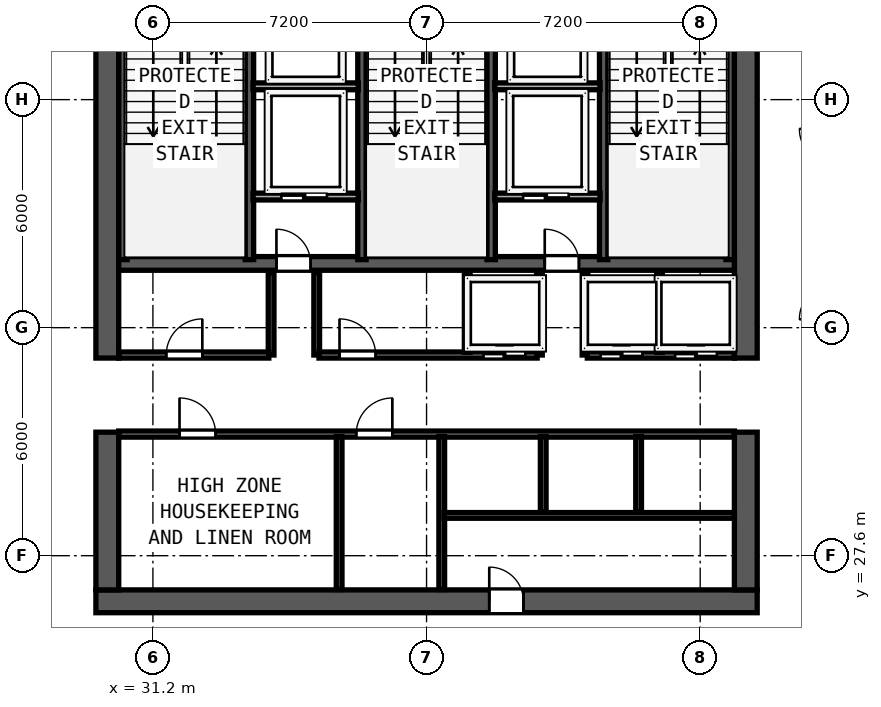
"""IFC4 building model, lengths in metres.
Left out: names, types, materials, properties, quantities, classifications, styles, units other than length and angle.
Written with IfcOpenShell. Run it as: python <this file> out.ifc"""

import sys

from ifc_helpers import new_model, si_unit, direction, frame, frame_2d, origin, place, context, subcontext, project, spatial, rectangle, extrude, element, fill, save


model = new_model("IFC4")
c1 = context("Model", 3, precision=1e-05, world=origin(), true_north=direction((0.0, 1.0)))
c2 = subcontext(c1, "Body", "Model", "MODEL_VIEW")
j1 = project(units=[si_unit("LENGTHUNIT", "METRE"), si_unit("PLANEANGLEUNIT", "RADIAN")], contexts=[c1])
p1 = place(None, origin())
s1 = spatial("IfcSite", under=j1, at=p1, CompositionType="ELEMENT")
p2 = place(p1, origin())
s2 = spatial("IfcBuilding", under=s1, at=p2, CompositionType="ELEMENT")
p3 = place(p2, frame((0.0, 0.0, 191.8)))
s3 = spatial("IfcBuildingStorey", under=s2, at=p3, CompositionType="ELEMENT", Elevation=191.8)
p4 = place(p3, frame((29.7, 26.4, 0.0), z_axis=(0.0, 0.0, 1.0), x_axis=(1.0, 0.0, 0.0)))
e1 = element("IfcWall", 1, at=p4, inside=s3, PredefinedType="SHEAR", context=c2, shape_type="SweptSolid", body=[
    extrude(rectangle(XDim=17.4, YDim=0.6, at=frame_2d((8.7, 0.0))), origin(), (0.0, 0.0, 1.0), 3.62),
])
p5 = place(p4, frame((11.25, 0.0, 0.0), z_axis=(0.0, 0.0, 1.0), x_axis=(-1.0, 0.0, 0.0)))
e2 = element("IfcOpeningElement", 2, at=p5, cuts=e1, PredefinedType="OPENING", context=c2, shape_type="SweptSolid", body=[
    extrude(rectangle(XDim=0.9, YDim=2.1, at=frame_2d((0.45, 1.05))), frame((0.0, 0.31, 0.0), z_axis=(0.0, -1.0, 0.0), x_axis=(1.0, 0.0, 0.0)), (0.0, 0.0, 1.0), 0.62),
])
p6 = place(p3, frame((30.0, 26.7, 0.0), z_axis=(0.0, 0.0, 1.0), x_axis=(0.0, 1.0, 0.0)))
e3 = element("IfcWall", 3, at=p6, inside=s3, PredefinedType="SHEAR", context=c2, shape_type="SweptSolid", body=[
    extrude(rectangle(XDim=4.15, YDim=0.6, at=frame_2d((2.075, 0.0))), origin(), (0.0, 0.0, 1.0), 3.62),
])
p7 = place(p3, frame((30.0, 32.8, 0.0), z_axis=(0.0, 0.0, 1.0), x_axis=(0.0, 1.0, 0.0)))
e4 = element("IfcWall", 4, at=p7, inside=s3, PredefinedType="SHEAR", context=c2, shape_type="SweptSolid", body=[
    extrude(rectangle(XDim=10.1, YDim=0.6, at=frame_2d((5.05, 0.0))), origin(), (0.0, 0.0, 1.0), 3.62),
])
p8 = place(p3, frame((46.8, 26.7, 0.0), z_axis=(0.0, 0.0, 1.0), x_axis=(0.0, 1.0, 0.0)))
e5 = element("IfcWall", 5, at=p8, inside=s3, PredefinedType="SHEAR", context=c2, shape_type="SweptSolid", body=[
    extrude(rectangle(XDim=4.15, YDim=0.6, at=frame_2d((2.075, 0.0))), origin(), (0.0, 0.0, 1.0), 3.62),
])
p9 = place(p3, frame((46.8, 32.8, 0.0), z_axis=(0.0, 0.0, 1.0), x_axis=(0.0, 1.0, 0.0)))
e6 = element("IfcWall", 6, at=p9, inside=s3, PredefinedType="SHEAR", context=c2, shape_type="SweptSolid", body=[
    extrude(rectangle(XDim=10.1, YDim=0.6, at=frame_2d((5.05, 0.0))), origin(), (0.0, 0.0, 1.0), 3.62),
])
p10 = place(p3, frame((30.3, 35.29, 0.0), z_axis=(0.0, 0.0, 1.0), x_axis=(1.0, 0.0, 0.0)))
e7 = element("IfcWall", 7, at=p10, inside=s3, PredefinedType="SHEAR", context=c2, shape_type="SweptSolid", body=[
    extrude(rectangle(XDim=16.2, YDim=0.36, at=frame_2d((8.1, 0.0))), origin(), (0.0, 0.0, 1.0), 3.62),
])
p11 = place(p10, frame((5.05, 0.0, 0.0), z_axis=(0.0, 0.0, 1.0), x_axis=(-1.0, 0.0, 0.0)))
e8 = element("IfcOpeningElement", 8, at=p11, cuts=e7, PredefinedType="OPENING", context=c2, shape_type="SweptSolid", body=[
    extrude(rectangle(XDim=0.9, YDim=2.1, at=frame_2d((0.45, 1.05))), frame((0.0, 0.19, 0.0), z_axis=(0.0, -1.0, 0.0), x_axis=(1.0, 0.0, 0.0)), (0.0, 0.0, 1.0), 0.38),
])
p12 = place(p10, frame((12.11, 0.0, 0.0), z_axis=(0.0, 0.0, 1.0), x_axis=(-1.0, 0.0, 0.0)))
e9 = element("IfcOpeningElement", 9, at=p12, cuts=e7, PredefinedType="OPENING", context=c2, shape_type="SweptSolid", body=[
    extrude(rectangle(XDim=0.9, YDim=2.1, at=frame_2d((0.45, 1.05))), frame((0.0, 0.19, 0.0), z_axis=(0.0, -1.0, 0.0), x_axis=(1.0, 0.0, 0.0)), (0.0, 0.0, 1.0), 0.38),
])
for number, where, z_axis, x_axis in (
    (10, (30.412, 35.39, 0.0), (0.0, 0.0, 1.0), (0.0, 1.0, 0.0)),
    (11, (33.74, 35.39, 0.0), (0.0, 0.0, 1.0), (0.0, 1.0, 0.0)),
    (12, (36.7, 35.39, 0.0), (0.0, 0.0, 1.0), (0.0, 1.0, 0.0)),
    (13, (40.1, 35.39, 0.0), (0.0, 0.0, 1.0), (0.0, 1.0, 0.0)),
    (14, (43.06, 35.39, 0.0), (0.0, 0.0, 1.0), (0.0, 1.0, 0.0)),
    (15, (46.388, 35.39, 0.0), (0.0, 0.0, 1.0), (0.0, 1.0, 0.0)),
):
    element("IfcWall", number, at=place(p3, frame(where, z_axis=z_axis, x_axis=x_axis)), inside=s3, PredefinedType="SHEAR", context=c2, shape_type="SweptSolid", body=[
        extrude(rectangle(XDim=7.51, YDim=0.22, at=frame_2d((3.755, 0.0))), origin(), (0.0, 0.0, 1.0), 3.62),
    ])
for number, where, z_axis, x_axis in (
    (16, (33.835, 39.95, 0.0), (0.0, 0.0, 1.0), (1.0, 0.0, 0.0)),
    (17, (40.195, 39.95, 0.0), (0.0, 0.0, 1.0), (1.0, 0.0, 0.0)),
):
    element("IfcWall", number, at=place(p3, frame(where, z_axis=z_axis, x_axis=x_axis)), inside=s3, PredefinedType="SOLIDWALL", context=c2, shape_type="SweptSolid", body=[
        extrude(rectangle(XDim=2.77, YDim=0.18, at=frame_2d((1.385, 0.0))), origin(), (0.0, 0.0, 1.0), 3.62),
    ])
p13 = place(p3, frame((33.835, 37.05, 0.0), z_axis=(0.0, 0.0, 1.0), x_axis=(1.0, 0.0, 0.0)))
e18 = element("IfcWall", 18, at=p13, inside=s3, PredefinedType="SOLIDWALL", context=c2, shape_type="SweptSolid", body=[
    extrude(rectangle(XDim=2.77, YDim=0.18, at=frame_2d((1.385, 0.0))), origin(), (0.0, 0.0, 1.0), 3.62),
])
p14 = place(p13, frame((1.945, 0.0, 0.0), z_axis=(0.0, 0.0, 1.0), x_axis=(-1.0, 0.0, 0.0)))
e19 = element("IfcOpeningElement", 19, at=p14, cuts=e18, PredefinedType="OPENING", context=c2, shape_type="SweptSolid", body=[
    extrude(rectangle(XDim=1.2, YDim=2.2, at=frame_2d((0.6, 1.1))), frame((0.0, 0.1, 0.0), z_axis=(0.0, -1.0, 0.0), x_axis=(1.0, 0.0, 0.0)), (0.0, 0.0, 1.0), 0.2),
])
for number, where, z_axis, x_axis in (
    (20, (34.31, 32.88, 0.0), (0.0, 0.0, 1.0), (0.0, 1.0, 0.0)),
    (21, (35.51, 32.88, 0.0), (0.0, 0.0, 1.0), (0.0, 1.0, 0.0)),
):
    element("IfcWall", number, at=place(p3, frame(where, z_axis=z_axis, x_axis=x_axis)), inside=s3, PredefinedType="SOLIDWALL", context=c2, shape_type="SweptSolid", body=[
        extrude(rectangle(XDim=2.17, YDim=0.15, at=frame_2d((1.085, 0.0))), origin(), (0.0, 0.0, 1.0), 3.62),
    ])
p15 = place(p3, frame((40.195, 37.05, 0.0), z_axis=(0.0, 0.0, 1.0), x_axis=(1.0, 0.0, 0.0)))
e22 = element("IfcWall", 22, at=p15, inside=s3, PredefinedType="SOLIDWALL", context=c2, shape_type="SweptSolid", body=[
    extrude(rectangle(XDim=2.77, YDim=0.18, at=frame_2d((1.385, 0.0))), origin(), (0.0, 0.0, 1.0), 3.62),
])
p16 = place(p15, frame((1.945, 0.0, 0.0), z_axis=(0.0, 0.0, 1.0), x_axis=(-1.0, 0.0, 0.0)))
e23 = element("IfcOpeningElement", 23, at=p16, cuts=e22, PredefinedType="OPENING", context=c2, shape_type="SweptSolid", body=[
    extrude(rectangle(XDim=1.2, YDim=2.2, at=frame_2d((0.6, 1.1))), frame((0.0, 0.1, 0.0), z_axis=(0.0, -1.0, 0.0), x_axis=(1.0, 0.0, 0.0)), (0.0, 0.0, 1.0), 0.2),
])
for number, where, z_axis, x_axis in (
    (24, (41.37, 32.88, 0.0), (0.0, 0.0, 1.0), (0.0, 1.0, 0.0)),
    (25, (42.57, 32.88, 0.0), (0.0, 0.0, 1.0), (0.0, 1.0, 0.0)),
):
    element("IfcWall", number, at=place(p3, frame(where, z_axis=z_axis, x_axis=x_axis)), inside=s3, PredefinedType="SOLIDWALL", context=c2, shape_type="SweptSolid", body=[
        extrude(rectangle(XDim=2.17, YDim=0.15, at=frame_2d((1.085, 0.0))), origin(), (0.0, 0.0, 1.0), 3.62),
    ])
p17 = place(p3, frame((30.3, 32.88, 0.0), z_axis=(0.0, 0.0, 1.0), x_axis=(1.0, 0.0, 0.0)))
e26 = element("IfcWall", 26, at=p17, inside=s3, PredefinedType="SOLIDWALL", context=c2, shape_type="SweptSolid", body=[
    extrude(rectangle(XDim=3.95, YDim=0.16, at=frame_2d((1.975, 0.0))), origin(), (0.0, 0.0, 1.0), 3.62),
])
p18 = place(p17, frame((2.2, 0.0, 0.0), z_axis=(0.0, 0.0, 1.0), x_axis=(-1.0, 0.0, 0.0)))
e27 = element("IfcOpeningElement", 27, at=p18, cuts=e26, PredefinedType="OPENING", context=c2, shape_type="SweptSolid", body=[
    extrude(rectangle(XDim=0.95, YDim=2.12, at=frame_2d((0.475, 1.06))), frame((0.0, 0.09, 0.0), z_axis=(0.0, -1.0, 0.0), x_axis=(1.0, 0.0, 0.0)), (0.0, 0.0, 1.0), 0.18),
])
p19 = place(p3, frame((35.57, 32.88, 0.0), z_axis=(0.0, 0.0, 1.0), x_axis=(1.0, 0.0, 0.0)))
e28 = element("IfcWall", 28, at=p19, inside=s3, PredefinedType="SOLIDWALL", context=c2, shape_type="SweptSolid", body=[
    extrude(rectangle(XDim=5.74, YDim=0.16, at=frame_2d((2.87, 0.0))), origin(), (0.0, 0.0, 1.0), 3.62),
])
p20 = place(p19, frame((1.49, 0.0, 0.0), z_axis=(0.0, 0.0, 1.0), x_axis=(-1.0, 0.0, 0.0)))
e29 = element("IfcOpeningElement", 29, at=p20, cuts=e28, PredefinedType="OPENING", context=c2, shape_type="SweptSolid", body=[
    extrude(rectangle(XDim=0.95, YDim=2.12, at=frame_2d((0.475, 1.06))), frame((0.0, 0.09, 0.0), z_axis=(0.0, -1.0, 0.0), x_axis=(1.0, 0.0, 0.0)), (0.0, 0.0, 1.0), 0.18),
])
p21 = place(p19, frame((5.43, 0.0, 0.0), z_axis=(0.0, 0.0, 1.0), x_axis=(-1.0, 0.0, 0.0)))
e30 = element("IfcOpeningElement", 30, at=p21, cuts=e28, PredefinedType="OPENING", context=c2, shape_type="SweptSolid", body=[
    extrude(rectangle(XDim=1.1, YDim=2.2, at=frame_2d((0.55, 1.1))), frame((0.0, 0.09, 0.0), z_axis=(0.0, -1.0, 0.0), x_axis=(1.0, 0.0, 0.0)), (0.0, 0.0, 1.0), 0.18),
])
p22 = place(p3, frame((42.63, 32.88, 0.0), z_axis=(0.0, 0.0, 1.0), x_axis=(1.0, 0.0, 0.0)))
e31 = element("IfcWall", 31, at=p22, inside=s3, PredefinedType="SOLIDWALL", context=c2, shape_type="SweptSolid", body=[
    extrude(rectangle(XDim=3.87, YDim=0.16, at=frame_2d((1.935, 0.0))), origin(), (0.0, 0.0, 1.0), 3.62),
])
p23 = place(p22, frame((1.45, 0.0, 0.0), z_axis=(0.0, 0.0, 1.0), x_axis=(-1.0, 0.0, 0.0)))
e32 = element("IfcOpeningElement", 32, at=p23, cuts=e31, PredefinedType="OPENING", context=c2, shape_type="SweptSolid", body=[
    extrude(rectangle(XDim=1.1, YDim=2.2, at=frame_2d((0.55, 1.1))), frame((0.0, 0.09, 0.0), z_axis=(0.0, -1.0, 0.0), x_axis=(1.0, 0.0, 0.0)), (0.0, 0.0, 1.0), 0.18),
])
p24 = place(p22, frame((3.41, 0.0, 0.0), z_axis=(0.0, 0.0, 1.0), x_axis=(-1.0, 0.0, 0.0)))
e33 = element("IfcOpeningElement", 33, at=p24, cuts=e31, PredefinedType="OPENING", context=c2, shape_type="SweptSolid", body=[
    extrude(rectangle(XDim=1.1, YDim=2.2, at=frame_2d((0.55, 1.1))), frame((0.0, 0.09, 0.0), z_axis=(0.0, -1.0, 0.0), x_axis=(1.0, 0.0, 0.0)), (0.0, 0.0, 1.0), 0.18),
])
for number, where, z_axis, x_axis in (
    (34, (39.47, 32.95, 0.0), (0.0, 0.0, 1.0), (0.0, 1.0, 0.0)),
    (35, (44.53, 32.95, 0.0), (0.0, 0.0, 1.0), (0.0, 1.0, 0.0)),
):
    element("IfcWall", number, at=place(p3, frame(where, z_axis=z_axis, x_axis=x_axis)), inside=s3, PredefinedType="SOLIDWALL", context=c2, shape_type="SweptSolid", body=[
        extrude(rectangle(XDim=2.05, YDim=0.15, at=frame_2d((1.025, 0.0))), origin(), (0.0, 0.0, 1.0), 3.62),
    ])
p25 = place(p3, frame((30.3, 30.8, 0.0), z_axis=(0.0, 0.0, 1.0), x_axis=(1.0, 0.0, 0.0)))
e36 = element("IfcWall", 36, at=p25, inside=s3, PredefinedType="SOLIDWALL", context=c2, shape_type="SweptSolid", body=[
    extrude(rectangle(XDim=16.2, YDim=0.16, at=frame_2d((8.1, 0.0))), origin(), (0.0, 0.0, 1.0), 3.62),
])
p26 = place(p25, frame((1.6, 0.0, 0.0)))
e37 = element("IfcOpeningElement", 37, at=p26, cuts=e36, PredefinedType="OPENING", context=c2, shape_type="SweptSolid", body=[
    extrude(rectangle(XDim=0.95, YDim=2.12, at=frame_2d((0.475, 1.06))), frame((0.0, 0.09, 0.0), z_axis=(0.0, -1.0, 0.0), x_axis=(1.0, 0.0, 0.0)), (0.0, 0.0, 1.0), 0.18),
])
p27 = place(p25, frame((6.25, 0.0, 0.0)))
e38 = element("IfcOpeningElement", 38, at=p27, cuts=e36, PredefinedType="OPENING", context=c2, shape_type="SweptSolid", body=[
    extrude(rectangle(XDim=0.95, YDim=2.12, at=frame_2d((0.475, 1.06))), frame((0.0, 0.09, 0.0), z_axis=(0.0, -1.0, 0.0), x_axis=(1.0, 0.0, 0.0)), (0.0, 0.0, 1.0), 0.18),
])
p28 = place(p3, frame((38.8, 26.71, 0.0), z_axis=(0.0, 0.0, 1.0), x_axis=(0.0, 1.0, 0.0)))
e39 = element("IfcWall", 39, at=p28, inside=s3, PredefinedType="SOLIDWALL", context=c2, shape_type="SweptSolid", body=[
    extrude(rectangle(XDim=4.025, YDim=0.15, at=frame_2d((2.013, 0.0))), origin(), (0.0, 0.0, 1.0), 3.62),
])
p29 = place(p3, frame((36.1, 26.71, 0.0), z_axis=(0.0, 0.0, 1.0), x_axis=(0.0, 1.0, 0.0)))
e40 = element("IfcWall", 40, at=p29, inside=s3, PredefinedType="PARTITIONING", context=c2, shape_type="SweptSolid", body=[
    extrude(rectangle(XDim=4.025, YDim=0.15, at=frame_2d((2.013, 0.0))), origin(), (0.0, 0.0, 1.0), 3.62),
])
p30 = place(p3, frame((38.86, 28.66, 0.0), z_axis=(0.0, 0.0, 1.0), x_axis=(1.0, 0.0, 0.0)))
e41 = element("IfcWall", 41, at=p30, inside=s3, PredefinedType="PARTITIONING", context=c2, shape_type="SweptSolid", body=[
    extrude(rectangle(XDim=7.64, YDim=0.15, at=frame_2d((3.82, 0.0))), origin(), (0.0, 0.0, 1.0), 3.62),
])
for number, where, z_axis, x_axis in (
    (42, (41.47, 28.75, 0.0), (0.0, 0.0, 1.0), (0.0, 1.0, 0.0)),
    (43, (43.98, 28.75, 0.0), (0.0, 0.0, 1.0), (0.0, 1.0, 0.0)),
):
    element("IfcWall", number, at=place(p3, frame(where, z_axis=z_axis, x_axis=x_axis)), inside=s3, PredefinedType="SOLIDWALL", context=c2, shape_type="SweptSolid", body=[
        extrude(rectangle(XDim=1.985, YDim=0.15, at=frame_2d((0.993, 0.0))), origin(), (0.0, 0.0, 1.0), 3.62),
    ])
p31 = place(p14, origin())
e44 = element("IfcDoor", 44, at=p31, inside=s3, OperationType="SLIDING_TO_RIGHT", PredefinedType="DOOR", context=c2, shape_type="SweptSolid", body=[
    extrude(rectangle(XDim=1.2, YDim=2.2, at=frame_2d((0.6, 1.1))), frame((0.0, 0.025, 0.0), z_axis=(0.0, -1.0, 0.0), x_axis=(1.0, 0.0, 0.0)), (0.0, 0.0, 1.0), 0.05),
])
fill(e19, e44)
p32 = place(p11, origin())
e45 = element("IfcDoor", 45, at=p32, inside=s3, OperationType="SINGLE_SWING_RIGHT", PredefinedType="DOOR", context=c2, shape_type="SweptSolid", body=[
    extrude(rectangle(XDim=0.9, YDim=2.1, at=frame_2d((0.45, 1.05))), frame((0.0, 0.025, 0.0), z_axis=(0.0, -1.0, 0.0), x_axis=(1.0, 0.0, 0.0)), (0.0, 0.0, 1.0), 0.05),
])
fill(e8, e45)
p33 = place(p16, origin())
e46 = element("IfcDoor", 46, at=p33, inside=s3, OperationType="SLIDING_TO_RIGHT", PredefinedType="DOOR", context=c2, shape_type="SweptSolid", body=[
    extrude(rectangle(XDim=1.2, YDim=2.2, at=frame_2d((0.6, 1.1))), frame((0.0, 0.025, 0.0), z_axis=(0.0, -1.0, 0.0), x_axis=(1.0, 0.0, 0.0)), (0.0, 0.0, 1.0), 0.05),
])
fill(e23, e46)
p34 = place(p12, origin())
e47 = element("IfcDoor", 47, at=p34, inside=s3, OperationType="SINGLE_SWING_RIGHT", PredefinedType="DOOR", context=c2, shape_type="SweptSolid", body=[
    extrude(rectangle(XDim=0.9, YDim=2.1, at=frame_2d((0.45, 1.05))), frame((0.0, 0.025, 0.0), z_axis=(0.0, -1.0, 0.0), x_axis=(1.0, 0.0, 0.0)), (0.0, 0.0, 1.0), 0.05),
])
fill(e9, e47)
p35 = place(p18, origin())
e48 = element("IfcDoor", 48, at=p35, inside=s3, OperationType="SINGLE_SWING_LEFT", PredefinedType="DOOR", context=c2, shape_type="SweptSolid", body=[
    extrude(rectangle(XDim=0.95, YDim=2.12, at=frame_2d((0.475, 1.06))), frame((0.0, 0.025, 0.0), z_axis=(0.0, -1.0, 0.0), x_axis=(1.0, 0.0, 0.0)), (0.0, 0.0, 1.0), 0.05),
])
fill(e27, e48)
p36 = place(p20, origin())
e49 = element("IfcDoor", 49, at=p36, inside=s3, OperationType="SINGLE_SWING_RIGHT", PredefinedType="DOOR", context=c2, shape_type="SweptSolid", body=[
    extrude(rectangle(XDim=0.95, YDim=2.12, at=frame_2d((0.475, 1.06))), frame((0.0, 0.025, 0.0), z_axis=(0.0, -1.0, 0.0), x_axis=(1.0, 0.0, 0.0)), (0.0, 0.0, 1.0), 0.05),
])
fill(e29, e49)
p37 = place(p21, origin())
e50 = element("IfcDoor", 50, at=p37, inside=s3, OperationType="SLIDING_TO_RIGHT", PredefinedType="DOOR", context=c2, shape_type="SweptSolid", body=[
    extrude(rectangle(XDim=1.1, YDim=2.2, at=frame_2d((0.55, 1.1))), frame((0.0, 0.025, 0.0), z_axis=(0.0, -1.0, 0.0), x_axis=(1.0, 0.0, 0.0)), (0.0, 0.0, 1.0), 0.05),
])
fill(e30, e50)
p38 = place(p23, origin())
e51 = element("IfcDoor", 51, at=p38, inside=s3, OperationType="SLIDING_TO_RIGHT", PredefinedType="DOOR", context=c2, shape_type="SweptSolid", body=[
    extrude(rectangle(XDim=1.1, YDim=2.2, at=frame_2d((0.55, 1.1))), frame((0.0, 0.025, 0.0), z_axis=(0.0, -1.0, 0.0), x_axis=(1.0, 0.0, 0.0)), (0.0, 0.0, 1.0), 0.05),
])
fill(e32, e51)
p39 = place(p24, origin())
e52 = element("IfcDoor", 52, at=p39, inside=s3, OperationType="SLIDING_TO_RIGHT", PredefinedType="DOOR", context=c2, shape_type="SweptSolid", body=[
    extrude(rectangle(XDim=1.1, YDim=2.2, at=frame_2d((0.55, 1.1))), frame((0.0, 0.025, 0.0), z_axis=(0.0, -1.0, 0.0), x_axis=(1.0, 0.0, 0.0)), (0.0, 0.0, 1.0), 0.05),
])
fill(e33, e52)
p40 = place(p26, origin())
e53 = element("IfcDoor", 53, at=p40, inside=s3, OperationType="SINGLE_SWING_LEFT", PredefinedType="DOOR", context=c2, shape_type="SweptSolid", body=[
    extrude(rectangle(XDim=0.95, YDim=2.12, at=frame_2d((0.475, 1.06))), frame((0.0, 0.025, 0.0), z_axis=(0.0, -1.0, 0.0), x_axis=(1.0, 0.0, 0.0)), (0.0, 0.0, 1.0), 0.05),
])
fill(e37, e53)
p41 = place(p27, origin())
e54 = element("IfcDoor", 54, at=p41, inside=s3, OperationType="SINGLE_SWING_RIGHT", PredefinedType="DOOR", context=c2, shape_type="SweptSolid", body=[
    extrude(rectangle(XDim=0.95, YDim=2.12, at=frame_2d((0.475, 1.06))), frame((0.0, 0.025, 0.0), z_axis=(0.0, -1.0, 0.0), x_axis=(1.0, 0.0, 0.0)), (0.0, 0.0, 1.0), 0.05),
])
fill(e38, e54)
p42 = place(p5, origin())
e55 = element("IfcDoor", 55, at=p42, inside=s3, OperationType="SINGLE_SWING_RIGHT", PredefinedType="DOOR", context=c2, shape_type="SweptSolid", body=[
    extrude(rectangle(XDim=0.9, YDim=2.1, at=frame_2d((0.45, 1.05))), frame((0.0, -0.195, 0.0), z_axis=(0.0, -1.0, 0.0), x_axis=(1.0, 0.0, 0.0)), (0.0, 0.0, 1.0), 0.05),
])
fill(e2, e55)
save(model, sys.argv[1])
